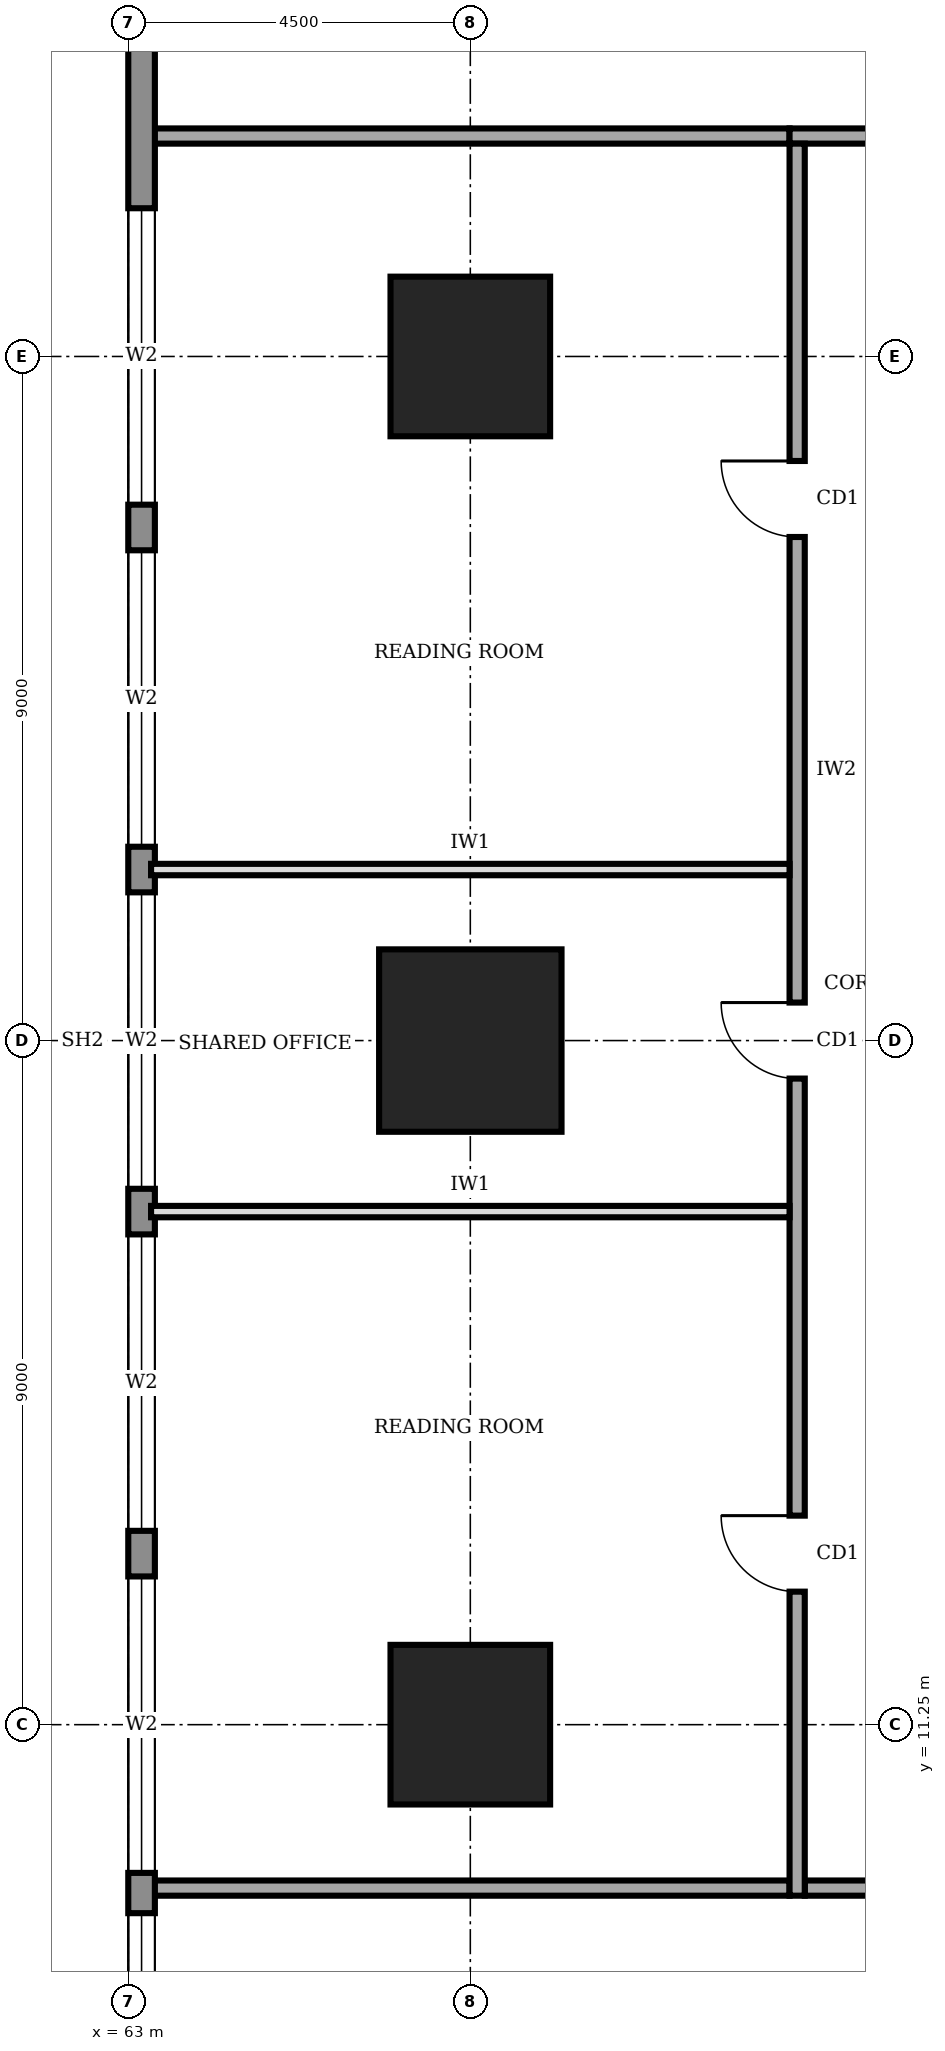
"""IFC4 building model, lengths in metres.
Left out: names, types, materials, properties, quantities, classifications, styles, units other than length and angle.
Written with IfcOpenShell. Run it as: python <this file> out.ifc"""

import sys

from ifc_helpers import new_model, si_unit, direction, frame, frame_2d, origin, origin_2d, place, context, subcontext, project, spatial, rectangle, extrude, element, fill, save


model = new_model("IFC4")
c1 = context("Model", 3, precision=1e-05, world=origin(), true_north=direction((0.0, 1.0)))
c2 = subcontext(c1, "Body", "Model", "MODEL_VIEW")
j1 = project(units=[si_unit("LENGTHUNIT", "METRE"), si_unit("PLANEANGLEUNIT", "RADIAN")], contexts=[c1])
p1 = place(None, origin())
s1 = spatial("IfcSite", under=j1, at=p1, CompositionType="ELEMENT")
p2 = place(p1, origin())
s2 = spatial("IfcBuilding", under=s1, at=p2, CompositionType="ELEMENT")
p3 = place(p2, frame((0.0, 0.0, 53.0)))
s3 = spatial("IfcBuildingStorey", under=s2, at=p3, CompositionType="ELEMENT", Elevation=53.0)
p4 = place(p3, frame((67.5, 11.25, 0.0), z_axis=(0.0, 0.0, 1.0), x_axis=(1.0, 0.0, 0.0)))
e1 = element("IfcColumn", 1, at=p4, inside=s3, PredefinedType="COLUMN", context=c2, shape_type="SweptSolid", body=[
    extrude(rectangle(XDim=2.1, YDim=2.1, at=origin_2d()), origin(), (0.0, 0.0, 1.0), 4.0),
])
p5 = place(p3, frame((67.5, 20.25, 0.0), z_axis=(0.0, 0.0, 1.0), x_axis=(1.0, 0.0, 0.0)))
e2 = element("IfcColumn", 2, at=p5, inside=s3, PredefinedType="COLUMN", context=c2, shape_type="SweptSolid", body=[
    extrude(rectangle(XDim=2.4, YDim=2.4, at=origin_2d()), origin(), (0.0, 0.0, 1.0), 4.0),
])
p6 = place(p3, frame((67.5, 29.25, 0.0), z_axis=(0.0, 0.0, 1.0), x_axis=(1.0, 0.0, 0.0)))
e3 = element("IfcColumn", 3, at=p6, inside=s3, PredefinedType="COLUMN", context=c2, shape_type="SweptSolid", body=[
    extrude(rectangle(XDim=2.1, YDim=2.1, at=origin_2d()), origin(), (0.0, 0.0, 1.0), 4.0),
])
p7 = place(p3, frame((63.175, 35.98, 0.0), z_axis=(0.0, 0.0, 1.0), x_axis=(0.0, -1.0, 0.0)))
e4 = element("IfcWall", 4, at=p7, inside=s3, PredefinedType="STANDARD", context=c2, shape_type="SweptSolid", body=[
    extrude(rectangle(XDim=31.46, YDim=0.35, at=frame_2d((15.73, 0.0))), origin(), (0.0, 0.0, 1.0), 3.75),
])
p8 = place(p7, frame((27.21, 0.0, 0.6)))
e5 = element("IfcOpeningElement", 5, at=p8, cuts=e4, PredefinedType="OPENING", context=c2, shape_type="SweptSolid", body=[
    extrude(rectangle(XDim=3.9, YDim=2.6, at=frame_2d((1.95, 1.3))), frame((0.0, 0.185, 0.0), z_axis=(0.0, -1.0, 0.0), x_axis=(1.0, 0.0, 0.0)), (0.0, 0.0, 1.0), 0.37),
])
p9 = place(p7, frame((22.78, 0.0, 0.6)))
e6 = element("IfcOpeningElement", 6, at=p9, cuts=e4, PredefinedType="OPENING", context=c2, shape_type="SweptSolid", body=[
    extrude(rectangle(XDim=3.9, YDim=2.6, at=frame_2d((1.95, 1.3))), frame((0.0, 0.185, 0.0), z_axis=(0.0, -1.0, 0.0), x_axis=(1.0, 0.0, 0.0)), (0.0, 0.0, 1.0), 0.37),
])
p10 = place(p7, frame((18.28, 0.0, 0.6)))
e7 = element("IfcOpeningElement", 7, at=p10, cuts=e4, PredefinedType="OPENING", context=c2, shape_type="SweptSolid", body=[
    extrude(rectangle(XDim=3.9, YDim=2.6, at=frame_2d((1.95, 1.3))), frame((0.0, 0.185, 0.0), z_axis=(0.0, -1.0, 0.0), x_axis=(1.0, 0.0, 0.0)), (0.0, 0.0, 1.0), 0.37),
])
p11 = place(p7, frame((13.78, 0.0, 0.6)))
e8 = element("IfcOpeningElement", 8, at=p11, cuts=e4, PredefinedType="OPENING", context=c2, shape_type="SweptSolid", body=[
    extrude(rectangle(XDim=3.9, YDim=2.6, at=frame_2d((1.95, 1.3))), frame((0.0, 0.185, 0.0), z_axis=(0.0, -1.0, 0.0), x_axis=(1.0, 0.0, 0.0)), (0.0, 0.0, 1.0), 0.37),
])
p12 = place(p7, frame((9.28, 0.0, 0.6)))
e9 = element("IfcOpeningElement", 9, at=p12, cuts=e4, PredefinedType="OPENING", context=c2, shape_type="SweptSolid", body=[
    extrude(rectangle(XDim=3.9, YDim=2.6, at=frame_2d((1.95, 1.3))), frame((0.0, 0.185, 0.0), z_axis=(0.0, -1.0, 0.0), x_axis=(1.0, 0.0, 0.0)), (0.0, 0.0, 1.0), 0.37),
])
p13 = place(p7, frame((4.78, 0.0, 0.6)))
e10 = element("IfcOpeningElement", 10, at=p13, cuts=e4, PredefinedType="OPENING", context=c2, shape_type="SweptSolid", body=[
    extrude(rectangle(XDim=3.9, YDim=2.6, at=frame_2d((1.95, 1.3))), frame((0.0, 0.185, 0.0), z_axis=(0.0, -1.0, 0.0), x_axis=(1.0, 0.0, 0.0)), (0.0, 0.0, 1.0), 0.37),
])
p14 = place(p3, frame((71.9, 9.1, 0.0), z_axis=(0.0, 0.0, 1.0), x_axis=(1.0, 0.0, 0.0)))
e11 = element("IfcWall", 11, at=p14, inside=s3, PredefinedType="SOLIDWALL", context=c2, shape_type="SweptSolid", body=[
    extrude(rectangle(XDim=17.65, YDim=0.2, at=frame_2d((8.825, 0.0))), origin(), (0.0, 0.0, 1.0), 3.75),
])
p15 = place(p14, frame((5.8, 0.0, 0.0)))
e12 = element("IfcOpeningElement", 12, at=p15, cuts=e11, PredefinedType="OPENING", context=c2, shape_type="SweptSolid", body=[
    extrude(rectangle(XDim=1.8, YDim=2.1, at=frame_2d((0.9, 1.05))), frame((0.0, 0.11, 0.0), z_axis=(0.0, -1.0, 0.0), x_axis=(1.0, 0.0, 0.0)), (0.0, 0.0, 1.0), 0.22),
])
p16 = place(p14, frame((14.725, 0.0, 0.0)))
e13 = element("IfcOpeningElement", 13, at=p16, cuts=e11, PredefinedType="OPENING", context=c2, shape_type="SweptSolid", body=[
    extrude(rectangle(XDim=1.8, YDim=2.1, at=frame_2d((0.9, 1.05))), frame((0.0, 0.11, 0.0), z_axis=(0.0, -1.0, 0.0), x_axis=(1.0, 0.0, 0.0)), (0.0, 0.0, 1.0), 0.22),
])
p17 = place(p3, frame((89.35, 32.15, 0.0), z_axis=(0.0, 0.0, 1.0), x_axis=(-1.0, 0.0, 0.0)))
e14 = element("IfcWall", 14, at=p17, inside=s3, PredefinedType="SOLIDWALL", context=c2, shape_type="SweptSolid", body=[
    extrude(rectangle(XDim=17.65, YDim=0.2, at=frame_2d((8.825, 0.0))), origin(), (0.0, 0.0, 1.0), 3.75),
])
p18 = place(p17, frame((14.75, 0.0, 0.0)))
e15 = element("IfcOpeningElement", 15, at=p18, cuts=e14, PredefinedType="OPENING", context=c2, shape_type="SweptSolid", body=[
    extrude(rectangle(XDim=1.0, YDim=2.1, at=frame_2d((0.5, 1.05))), frame((0.0, 0.11, 0.0), z_axis=(0.0, -1.0, 0.0), x_axis=(1.0, 0.0, 0.0)), (0.0, 0.0, 1.0), 0.22),
])
p19 = place(p17, frame((7.85, 0.0, 0.0)))
e16 = element("IfcOpeningElement", 16, at=p19, cuts=e14, PredefinedType="OPENING", context=c2, shape_type="SweptSolid", body=[
    extrude(rectangle(XDim=1.0, YDim=2.1, at=frame_2d((0.5, 1.05))), frame((0.0, 0.11, 0.0), z_axis=(0.0, -1.0, 0.0), x_axis=(1.0, 0.0, 0.0)), (0.0, 0.0, 1.0), 0.22),
])
p20 = place(p17, frame((1.325, 0.0, 0.0)))
e17 = element("IfcOpeningElement", 17, at=p20, cuts=e14, PredefinedType="OPENING", context=c2, shape_type="SweptSolid", body=[
    extrude(rectangle(XDim=1.0, YDim=2.1, at=frame_2d((0.5, 1.05))), frame((0.0, 0.11, 0.0), z_axis=(0.0, -1.0, 0.0), x_axis=(1.0, 0.0, 0.0)), (0.0, 0.0, 1.0), 0.22),
])
p21 = place(p3, frame((71.8, 32.05, 0.0), z_axis=(0.0, 0.0, 1.0), x_axis=(0.0, -1.0, 0.0)))
e18 = element("IfcWall", 18, at=p21, inside=s3, PredefinedType="SOLIDWALL", context=c2, shape_type="SweptSolid", body=[
    extrude(rectangle(XDim=23.05, YDim=0.2, at=frame_2d((11.525, 0.0))), origin(), (0.0, 0.0, 1.0), 3.75),
])
p22 = place(p21, frame((18.05, 0.0, 0.0)))
e19 = element("IfcOpeningElement", 19, at=p22, cuts=e18, PredefinedType="OPENING", context=c2, shape_type="SweptSolid", body=[
    extrude(rectangle(XDim=1.0, YDim=2.1, at=frame_2d((0.5, 1.05))), frame((0.0, 0.11, 0.0), z_axis=(0.0, -1.0, 0.0), x_axis=(1.0, 0.0, 0.0)), (0.0, 0.0, 1.0), 0.22),
])
p23 = place(p21, frame((11.3, 0.0, 0.0)))
e20 = element("IfcOpeningElement", 20, at=p23, cuts=e18, PredefinedType="OPENING", context=c2, shape_type="SweptSolid", body=[
    extrude(rectangle(XDim=1.0, YDim=2.1, at=frame_2d((0.5, 1.05))), frame((0.0, 0.11, 0.0), z_axis=(0.0, -1.0, 0.0), x_axis=(1.0, 0.0, 0.0)), (0.0, 0.0, 1.0), 0.22),
])
p24 = place(p21, frame((4.175, 0.0, 0.0)))
e21 = element("IfcOpeningElement", 21, at=p24, cuts=e18, PredefinedType="OPENING", context=c2, shape_type="SweptSolid", body=[
    extrude(rectangle(XDim=1.0, YDim=2.1, at=frame_2d((0.5, 1.05))), frame((0.0, 0.11, 0.0), z_axis=(0.0, -1.0, 0.0), x_axis=(1.0, 0.0, 0.0)), (0.0, 0.0, 1.0), 0.22),
])
for number, where, z_axis, x_axis in (
    (22, (63.3, 9.1, 0.0), (0.0, 0.0, 1.0), (1.0, 0.0, 0.0)),
    (23, (63.3, 32.15, 0.0), (0.0, 0.0, 1.0), (1.0, 0.0, 0.0)),
):
    element("IfcWall", number, at=place(p3, frame(where, z_axis=z_axis, x_axis=x_axis)), inside=s3, PredefinedType="SOLIDWALL", context=c2, shape_type="SweptSolid", body=[
        extrude(rectangle(XDim=8.4, YDim=0.2, at=frame_2d((4.2, 0.0))), origin(), (0.0, 0.0, 1.0), 3.75),
    ])
for number, where, z_axis, x_axis in (
    (24, (63.3, 18.0, 0.0), (0.0, 0.0, 1.0), (1.0, 0.0, 0.0)),
    (25, (63.3, 22.5, 0.0), (0.0, 0.0, 1.0), (1.0, 0.0, 0.0)),
):
    element("IfcWall", number, at=place(p3, frame(where, z_axis=z_axis, x_axis=x_axis)), inside=s3, PredefinedType="PARTITIONING", context=c2, shape_type="SweptSolid", body=[
        extrude(rectangle(XDim=8.4, YDim=0.15, at=frame_2d((4.2, 0.0))), origin(), (0.0, 0.0, 1.0), 3.75),
    ])
p25 = place(p8, origin())
e26 = element("IfcWindow", 26, at=p25, inside=s3, PartitioningType="SINGLE_PANEL", PredefinedType="WINDOW", context=c2, shape_type="SweptSolid", body=[
    extrude(rectangle(XDim=3.9, YDim=2.6, at=frame_2d((1.95, 1.3))), frame((0.0, 0.03, 0.0), z_axis=(0.0, -1.0, 0.0), x_axis=(1.0, 0.0, 0.0)), (0.0, 0.0, 1.0), 0.06),
])
fill(e5, e26)
p26 = place(p9, origin())
e27 = element("IfcWindow", 27, at=p26, inside=s3, PartitioningType="SINGLE_PANEL", PredefinedType="WINDOW", context=c2, shape_type="SweptSolid", body=[
    extrude(rectangle(XDim=3.9, YDim=2.6, at=frame_2d((1.95, 1.3))), frame((0.0, 0.03, 0.0), z_axis=(0.0, -1.0, 0.0), x_axis=(1.0, 0.0, 0.0)), (0.0, 0.0, 1.0), 0.06),
])
fill(e6, e27)
p27 = place(p10, origin())
e28 = element("IfcWindow", 28, at=p27, inside=s3, PartitioningType="SINGLE_PANEL", PredefinedType="WINDOW", context=c2, shape_type="SweptSolid", body=[
    extrude(rectangle(XDim=3.9, YDim=2.6, at=frame_2d((1.95, 1.3))), frame((0.0, 0.03, 0.0), z_axis=(0.0, -1.0, 0.0), x_axis=(1.0, 0.0, 0.0)), (0.0, 0.0, 1.0), 0.06),
])
fill(e7, e28)
p28 = place(p11, origin())
e29 = element("IfcWindow", 29, at=p28, inside=s3, PartitioningType="SINGLE_PANEL", PredefinedType="WINDOW", context=c2, shape_type="SweptSolid", body=[
    extrude(rectangle(XDim=3.9, YDim=2.6, at=frame_2d((1.95, 1.3))), frame((0.0, 0.03, 0.0), z_axis=(0.0, -1.0, 0.0), x_axis=(1.0, 0.0, 0.0)), (0.0, 0.0, 1.0), 0.06),
])
fill(e8, e29)
p29 = place(p12, origin())
e30 = element("IfcWindow", 30, at=p29, inside=s3, PartitioningType="SINGLE_PANEL", PredefinedType="WINDOW", context=c2, shape_type="SweptSolid", body=[
    extrude(rectangle(XDim=3.9, YDim=2.6, at=frame_2d((1.95, 1.3))), frame((0.0, 0.03, 0.0), z_axis=(0.0, -1.0, 0.0), x_axis=(1.0, 0.0, 0.0)), (0.0, 0.0, 1.0), 0.06),
])
fill(e9, e30)
p30 = place(p13, origin())
e31 = element("IfcWindow", 31, at=p30, inside=s3, PartitioningType="SINGLE_PANEL", PredefinedType="WINDOW", context=c2, shape_type="SweptSolid", body=[
    extrude(rectangle(XDim=3.9, YDim=2.6, at=frame_2d((1.95, 1.3))), frame((0.0, 0.03, 0.0), z_axis=(0.0, -1.0, 0.0), x_axis=(1.0, 0.0, 0.0)), (0.0, 0.0, 1.0), 0.06),
])
fill(e10, e31)
p31 = place(p22, frame((1.0, 0.0, 0.0), z_axis=(0.0, 0.0, 1.0), x_axis=(-1.0, 0.0, 0.0)))
e32 = element("IfcDoor", 32, at=p31, inside=s3, OperationType="SINGLE_SWING_RIGHT", PredefinedType="DOOR", context=c2, shape_type="SweptSolid", body=[
    extrude(rectangle(XDim=1.0, YDim=2.1, at=frame_2d((0.5, 1.05))), frame((0.0, 0.025, 0.0), z_axis=(0.0, -1.0, 0.0), x_axis=(1.0, 0.0, 0.0)), (0.0, 0.0, 1.0), 0.05),
])
fill(e19, e32)
p32 = place(p23, frame((1.0, 0.0, 0.0), z_axis=(0.0, 0.0, 1.0), x_axis=(-1.0, 0.0, 0.0)))
e33 = element("IfcDoor", 33, at=p32, inside=s3, OperationType="SINGLE_SWING_RIGHT", PredefinedType="DOOR", context=c2, shape_type="SweptSolid", body=[
    extrude(rectangle(XDim=1.0, YDim=2.1, at=frame_2d((0.5, 1.05))), frame((0.0, 0.025, 0.0), z_axis=(0.0, -1.0, 0.0), x_axis=(1.0, 0.0, 0.0)), (0.0, 0.0, 1.0), 0.05),
])
fill(e20, e33)
p33 = place(p24, frame((1.0, 0.0, 0.0), z_axis=(0.0, 0.0, 1.0), x_axis=(-1.0, 0.0, 0.0)))
e34 = element("IfcDoor", 34, at=p33, inside=s3, OperationType="SINGLE_SWING_RIGHT", PredefinedType="DOOR", context=c2, shape_type="SweptSolid", body=[
    extrude(rectangle(XDim=1.0, YDim=2.1, at=frame_2d((0.5, 1.05))), frame((0.0, 0.025, 0.0), z_axis=(0.0, -1.0, 0.0), x_axis=(1.0, 0.0, 0.0)), (0.0, 0.0, 1.0), 0.05),
])
fill(e21, e34)
save(model, sys.argv[1])
